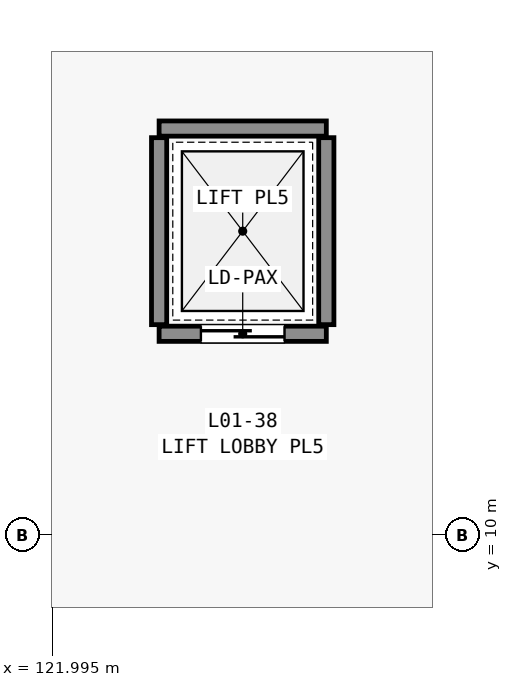
"""IFC4 building model, lengths in metres.
Left out: names, types, materials, properties, quantities, classifications, styles, units other than length and angle.
Written with IfcOpenShell. Run it as: python <this file> out.ifc"""

import sys

from ifc_helpers import new_model, si_unit, direction, frame, frame_2d, origin, place, context, subcontext, project, spatial, rectangle, extrude, element, fill, save


model = new_model("IFC4")
c1 = context("Model", 3, precision=1e-05, world=origin(), true_north=direction((0.0, 1.0)))
c2 = subcontext(c1, "Body", "Model", "MODEL_VIEW")
j1 = project(units=[si_unit("LENGTHUNIT", "METRE"), si_unit("PLANEANGLEUNIT", "RADIAN")], contexts=[c1])
p1 = place(None, origin())
s1 = spatial("IfcSite", under=j1, at=p1, CompositionType="ELEMENT")
p2 = place(p1, origin())
s2 = spatial("IfcBuilding", under=s1, at=p2, CompositionType="ELEMENT")
p3 = place(p2, frame((0.0, 0.0, 6.0)))
s3 = spatial("IfcBuildingStorey", under=s2, at=p3, CompositionType="ELEMENT", Elevation=6.0)
p4 = place(p3, frame((123.4, 12.65, 0.0), z_axis=(0.0, 0.0, 1.0), x_axis=(1.0, 0.0, 0.0)))
e1 = element("IfcWall", 1, at=p4, inside=s3, PredefinedType="STANDARD", context=c2, shape_type="SweptSolid", body=[
    extrude(rectangle(XDim=2.2, YDim=0.2, at=frame_2d((1.1, 0.0))), origin(), (0.0, 0.0, 1.0), 5.1),
])
p5 = place(p4, frame((0.55, 0.0, 0.0)))
e2 = element("IfcOpeningElement", 2, at=p5, cuts=e1, PredefinedType="OPENING", context=c2, shape_type="SweptSolid", body=[
    extrude(rectangle(XDim=1.1, YDim=2.15, at=frame_2d((0.55, 1.075))), frame((0.0, 0.11, 0.0), z_axis=(0.0, -1.0, 0.0), x_axis=(1.0, 0.0, 0.0)), (0.0, 0.0, 1.0), 0.22),
])
p6 = place(p3, frame((123.4, 15.35, 0.0), z_axis=(0.0, 0.0, 1.0), x_axis=(1.0, 0.0, 0.0)))
e3 = element("IfcWall", 3, at=p6, inside=s3, PredefinedType="STANDARD", context=c2, shape_type="SweptSolid", body=[
    extrude(rectangle(XDim=2.2, YDim=0.2, at=frame_2d((1.1, 0.0))), origin(), (0.0, 0.0, 1.0), 5.1),
])
for number, where, z_axis, x_axis in (
    (4, (123.4, 12.77, 0.0), (0.0, 0.0, 1.0), (0.0, 1.0, 0.0)),
    (5, (125.6, 12.77, 0.0), (0.0, 0.0, 1.0), (0.0, 1.0, 0.0)),
):
    element("IfcWall", number, at=place(p3, frame(where, z_axis=z_axis, x_axis=x_axis)), inside=s3, PredefinedType="STANDARD", context=c2, shape_type="SweptSolid", body=[
        extrude(rectangle(XDim=2.46, YDim=0.2, at=frame_2d((1.23, 0.0))), origin(), (0.0, 0.0, 1.0), 5.1),
    ])
p7 = place(p5, origin())
e6 = element("IfcDoor", 6, at=p7, inside=s3, OperationType="SLIDING_TO_LEFT", PredefinedType="DOOR", context=c2, shape_type="SweptSolid", body=[
    extrude(rectangle(XDim=1.1, YDim=2.15, at=frame_2d((0.55, 1.075))), frame((0.0, 0.025, 0.0), z_axis=(0.0, -1.0, 0.0), x_axis=(1.0, 0.0, 0.0)), (0.0, 0.0, 1.0), 0.05),
])
fill(e2, e6)
save(model, sys.argv[1])
